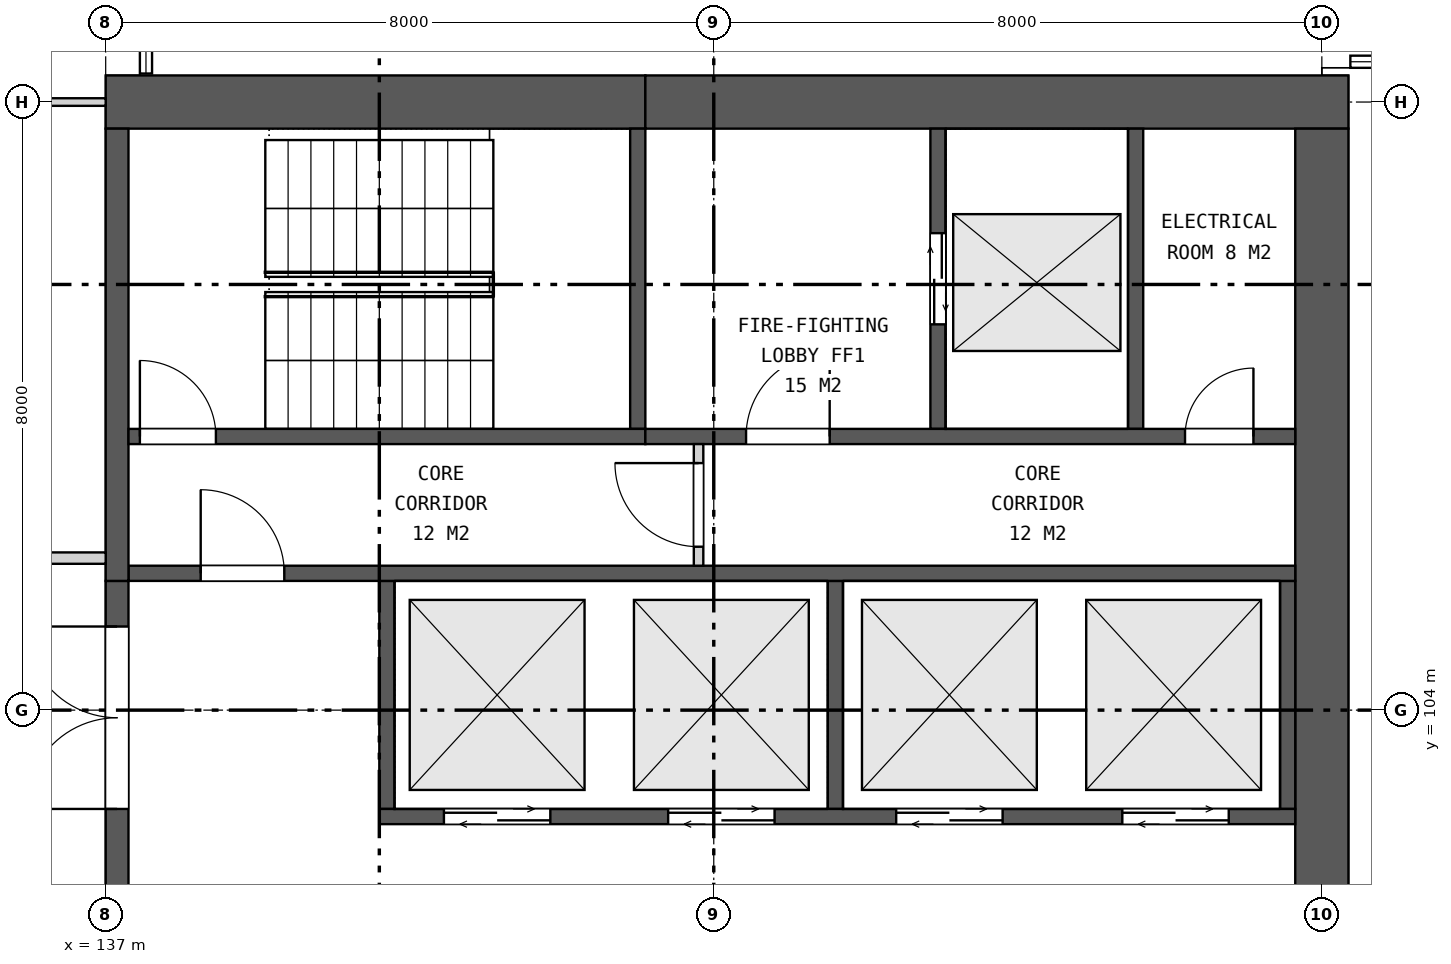
"""IFC4 building model, lengths in metres.
Left out: names, types, materials, properties, quantities, classifications, styles, units other than length and angle.
Written with IfcOpenShell. Run it as: python <this file> out.ifc"""

import sys

from ifc_helpers import new_model, si_unit, direction, frame, frame_2d, origin, place, context, subcontext, project, spatial, rectangle, extrude, element, fill, save


model = new_model("IFC4")
c1 = context("Model", 3, precision=1e-05, world=origin(), true_north=direction((0.0, 1.0)))
c2 = subcontext(c1, "Body", "Model", "MODEL_VIEW")
j1 = project(units=[si_unit("LENGTHUNIT", "METRE"), si_unit("PLANEANGLEUNIT", "RADIAN")], contexts=[c1])
p1 = place(None, origin())
s1 = spatial("IfcSite", under=j1, at=p1, CompositionType="ELEMENT")
p2 = place(p1, origin())
s2 = spatial("IfcBuilding", under=s1, at=p2, CompositionType="ELEMENT")
p3 = place(p2, frame((0.0, 0.0, 167.3)))
s3 = spatial("IfcBuildingStorey", under=s2, at=p3, CompositionType="ELEMENT", Elevation=167.3)
p4 = place(p3, frame((137.0, 112.0, 0.0), z_axis=(0.0, 0.0, 1.0), x_axis=(1.0, 0.0, 0.0)))
e1 = element("IfcWall", 1, at=p4, inside=s3, PredefinedType="SHEAR", context=c2, shape_type="SweptSolid", body=[
    extrude(rectangle(XDim=7.1, YDim=0.7, at=frame_2d((3.55, 0.0))), origin(), (0.0, 0.0, 1.0), 4.2),
])
p5 = place(p3, frame((144.1, 112.0, 0.0), z_axis=(0.0, 0.0, 1.0), x_axis=(1.0, 0.0, 0.0)))
e2 = element("IfcWall", 2, at=p5, inside=s3, PredefinedType="SHEAR", context=c2, shape_type="SweptSolid", body=[
    extrude(rectangle(XDim=9.25, YDim=0.7, at=frame_2d((4.625, 0.0))), origin(), (0.0, 0.0, 1.0), 4.2),
])
p6 = place(p3, frame((153.0, 88.35, 0.0), z_axis=(0.0, 0.0, 1.0), x_axis=(0.0, 1.0, 0.0)))
e3 = element("IfcWall", 3, at=p6, inside=s3, PredefinedType="SHEAR", context=c2, shape_type="SweptSolid", body=[
    extrude(rectangle(XDim=23.3, YDim=0.7, at=frame_2d((11.65, 0.0))), origin(), (0.0, 0.0, 1.0), 4.2),
])
p7 = place(p6, frame((10.45, 0.0, 0.0)))
e4 = element("IfcOpeningElement", 4, at=p7, cuts=e3, PredefinedType="OPENING", context=c2, shape_type="SweptSolid", body=[
    extrude(rectangle(XDim=2.4, YDim=2.4, at=frame_2d((1.2, 1.2))), frame((0.0, 0.36, 0.0), z_axis=(0.0, -1.0, 0.0), x_axis=(1.0, 0.0, 0.0)), (0.0, 0.0, 1.0), 0.72),
])
p8 = place(p3, frame((137.15, 94.3, 0.0), z_axis=(0.0, 0.0, 1.0), x_axis=(0.0, 1.0, 0.0)))
e5 = element("IfcWall", 5, at=p8, inside=s3, PredefinedType="SHEAR", context=c2, shape_type="SweptSolid", body=[
    extrude(rectangle(XDim=11.4, YDim=0.3, at=frame_2d((5.7, 0.0))), origin(), (0.0, 0.0, 1.0), 4.2),
])
p9 = place(p8, frame((0.6, 0.0, 0.0)))
e6 = element("IfcOpeningElement", 6, at=p9, cuts=e5, PredefinedType="OPENING", context=c2, shape_type="SweptSolid", body=[
    extrude(rectangle(XDim=2.4, YDim=2.4, at=frame_2d((1.2, 1.2))), frame((0.0, 0.16, 0.0), z_axis=(0.0, -1.0, 0.0), x_axis=(1.0, 0.0, 0.0)), (0.0, 0.0, 1.0), 0.32),
])
p10 = place(p8, frame((4.5, 0.0, 0.0)))
e7 = element("IfcOpeningElement", 7, at=p10, cuts=e5, PredefinedType="OPENING", context=c2, shape_type="SweptSolid", body=[
    extrude(rectangle(XDim=2.4, YDim=2.4, at=frame_2d((1.2, 1.2))), frame((0.0, 0.16, 0.0), z_axis=(0.0, -1.0, 0.0), x_axis=(1.0, 0.0, 0.0)), (0.0, 0.0, 1.0), 0.32),
])
p11 = place(p8, frame((8.4, 0.0, 0.0)))
e8 = element("IfcOpeningElement", 8, at=p11, cuts=e5, PredefinedType="OPENING", context=c2, shape_type="SweptSolid", body=[
    extrude(rectangle(XDim=2.4, YDim=2.4, at=frame_2d((1.2, 1.2))), frame((0.0, 0.16, 0.0), z_axis=(0.0, -1.0, 0.0), x_axis=(1.0, 0.0, 0.0)), (0.0, 0.0, 1.0), 0.32),
])
for number, where, z_axis, x_axis in (
    (9, (140.7, 102.7, 0.0), (0.0, 0.0, 1.0), (0.0, 1.0, 0.0)),
    (10, (146.6, 102.7, 0.0), (0.0, 0.0, 1.0), (0.0, 1.0, 0.0)),
    (11, (152.55, 102.7, 0.0), (0.0, 0.0, 1.0), (0.0, 1.0, 0.0)),
):
    element("IfcWall", number, at=place(p3, frame(where, z_axis=z_axis, x_axis=x_axis)), inside=s3, PredefinedType="SHEAR", context=c2, shape_type="SweptSolid", body=[
        extrude(rectangle(XDim=3.0, YDim=0.2, at=frame_2d((1.5, 0.0))), origin(), (0.0, 0.0, 1.0), 4.2),
    ])
p12 = place(p3, frame((140.6, 102.6, 0.0), z_axis=(0.0, 0.0, 1.0), x_axis=(1.0, 0.0, 0.0)))
e12 = element("IfcWall", 12, at=p12, inside=s3, PredefinedType="SHEAR", context=c2, shape_type="SweptSolid", body=[
    extrude(rectangle(XDim=12.05, YDim=0.2, at=frame_2d((6.025, 0.0))), origin(), (0.0, 0.0, 1.0), 4.2),
])
p13 = place(p12, frame((0.85, 0.0, 0.0)))
e13 = element("IfcOpeningElement", 13, at=p13, cuts=e12, PredefinedType="OPENING", context=c2, shape_type="SweptSolid", body=[
    extrude(rectangle(XDim=1.4, YDim=2.1, at=frame_2d((0.7, 1.05))), frame((0.0, 0.11, 0.0), z_axis=(0.0, -1.0, 0.0), x_axis=(1.0, 0.0, 0.0)), (0.0, 0.0, 1.0), 0.22),
])
p14 = place(p12, frame((3.8, 0.0, 0.0)))
e14 = element("IfcOpeningElement", 14, at=p14, cuts=e12, PredefinedType="OPENING", context=c2, shape_type="SweptSolid", body=[
    extrude(rectangle(XDim=1.4, YDim=2.1, at=frame_2d((0.7, 1.05))), frame((0.0, 0.11, 0.0), z_axis=(0.0, -1.0, 0.0), x_axis=(1.0, 0.0, 0.0)), (0.0, 0.0, 1.0), 0.22),
])
p15 = place(p12, frame((6.8, 0.0, 0.0)))
e15 = element("IfcOpeningElement", 15, at=p15, cuts=e12, PredefinedType="OPENING", context=c2, shape_type="SweptSolid", body=[
    extrude(rectangle(XDim=1.4, YDim=2.1, at=frame_2d((0.7, 1.05))), frame((0.0, 0.11, 0.0), z_axis=(0.0, -1.0, 0.0), x_axis=(1.0, 0.0, 0.0)), (0.0, 0.0, 1.0), 0.22),
])
p16 = place(p12, frame((9.775, 0.0, 0.0)))
e16 = element("IfcOpeningElement", 16, at=p16, cuts=e12, PredefinedType="OPENING", context=c2, shape_type="SweptSolid", body=[
    extrude(rectangle(XDim=1.4, YDim=2.1, at=frame_2d((0.7, 1.05))), frame((0.0, 0.11, 0.0), z_axis=(0.0, -1.0, 0.0), x_axis=(1.0, 0.0, 0.0)), (0.0, 0.0, 1.0), 0.22),
])
p17 = place(p3, frame((137.3, 105.8, 0.0), z_axis=(0.0, 0.0, 1.0), x_axis=(1.0, 0.0, 0.0)))
e17 = element("IfcWall", 17, at=p17, inside=s3, PredefinedType="SHEAR", context=c2, shape_type="SweptSolid", body=[
    extrude(rectangle(XDim=15.35, YDim=0.2, at=frame_2d((7.675, 0.0))), origin(), (0.0, 0.0, 1.0), 4.2),
])
p18 = place(p17, frame((0.95, 0.0, 0.0)))
e18 = element("IfcOpeningElement", 18, at=p18, cuts=e17, PredefinedType="OPENING", context=c2, shape_type="SweptSolid", body=[
    extrude(rectangle(XDim=1.1, YDim=2.1, at=frame_2d((0.55, 1.05))), frame((0.0, 0.11, 0.0), z_axis=(0.0, -1.0, 0.0), x_axis=(1.0, 0.0, 0.0)), (0.0, 0.0, 1.0), 0.22),
])
p19 = place(p3, frame((137.15, 105.7, 0.0), z_axis=(0.0, 0.0, 1.0), x_axis=(0.0, 1.0, 0.0)))
e19 = element("IfcWall", 19, at=p19, inside=s3, PredefinedType="SHEAR", context=c2, shape_type="SweptSolid", body=[
    extrude(rectangle(XDim=5.95, YDim=0.3, at=frame_2d((2.975, 0.0))), origin(), (0.0, 0.0, 1.0), 4.2),
])
p20 = place(p3, frame((144.0, 107.7, 0.0), z_axis=(0.0, 0.0, 1.0), x_axis=(0.0, 1.0, 0.0)))
e20 = element("IfcWall", 20, at=p20, inside=s3, PredefinedType="SHEAR", context=c2, shape_type="SweptSolid", body=[
    extrude(rectangle(XDim=3.95, YDim=0.2, at=frame_2d((1.975, 0.0))), origin(), (0.0, 0.0, 1.0), 4.2),
])
p21 = place(p3, frame((147.95, 107.7, 0.0), z_axis=(0.0, 0.0, 1.0), x_axis=(0.0, 1.0, 0.0)))
e21 = element("IfcWall", 21, at=p21, inside=s3, PredefinedType="SHEAR", context=c2, shape_type="SweptSolid", body=[
    extrude(rectangle(XDim=3.95, YDim=0.2, at=frame_2d((1.975, 0.0))), origin(), (0.0, 0.0, 1.0), 4.2),
])
p22 = place(p21, frame((1.375, 0.0, 0.0)))
e22 = element("IfcOpeningElement", 22, at=p22, cuts=e21, PredefinedType="OPENING", context=c2, shape_type="SweptSolid", body=[
    extrude(rectangle(XDim=1.2, YDim=2.1, at=frame_2d((0.6, 1.05))), frame((0.0, 0.11, 0.0), z_axis=(0.0, -1.0, 0.0), x_axis=(1.0, 0.0, 0.0)), (0.0, 0.0, 1.0), 0.22),
])
p23 = place(p3, frame((150.55, 107.7, 0.0), z_axis=(0.0, 0.0, 1.0), x_axis=(0.0, 1.0, 0.0)))
e23 = element("IfcWall", 23, at=p23, inside=s3, PredefinedType="SHEAR", context=c2, shape_type="SweptSolid", body=[
    extrude(rectangle(XDim=3.95, YDim=0.2, at=frame_2d((1.975, 0.0))), origin(), (0.0, 0.0, 1.0), 4.2),
])
p24 = place(p3, frame((137.3, 107.6, 0.0), z_axis=(0.0, 0.0, 1.0), x_axis=(1.0, 0.0, 0.0)))
e24 = element("IfcWall", 24, at=p24, inside=s3, PredefinedType="SHEAR", context=c2, shape_type="SweptSolid", body=[
    extrude(rectangle(XDim=6.8, YDim=0.2, at=frame_2d((3.4, 0.0))), origin(), (0.0, 0.0, 1.0), 4.2),
])
p25 = place(p24, frame((0.15, 0.0, 0.0)))
e25 = element("IfcOpeningElement", 25, at=p25, cuts=e24, PredefinedType="OPENING", context=c2, shape_type="SweptSolid", body=[
    extrude(rectangle(XDim=1.0, YDim=2.1, at=frame_2d((0.5, 1.05))), frame((0.0, 0.11, 0.0), z_axis=(0.0, -1.0, 0.0), x_axis=(1.0, 0.0, 0.0)), (0.0, 0.0, 1.0), 0.22),
])
p26 = place(p3, frame((144.1, 107.6, 0.0), z_axis=(0.0, 0.0, 1.0), x_axis=(1.0, 0.0, 0.0)))
e26 = element("IfcWall", 26, at=p26, inside=s3, PredefinedType="SHEAR", context=c2, shape_type="SweptSolid", body=[
    extrude(rectangle(XDim=8.55, YDim=0.2, at=frame_2d((4.275, 0.0))), origin(), (0.0, 0.0, 1.0), 4.2),
])
p27 = place(p26, frame((1.325, 0.0, 0.0)))
e27 = element("IfcOpeningElement", 27, at=p27, cuts=e26, PredefinedType="OPENING", context=c2, shape_type="SweptSolid", body=[
    extrude(rectangle(XDim=1.1, YDim=2.1, at=frame_2d((0.55, 1.05))), frame((0.0, 0.11, 0.0), z_axis=(0.0, -1.0, 0.0), x_axis=(1.0, 0.0, 0.0)), (0.0, 0.0, 1.0), 0.22),
])
p28 = place(p26, frame((7.1, 0.0, 0.0)))
e28 = element("IfcOpeningElement", 28, at=p28, cuts=e26, PredefinedType="OPENING", context=c2, shape_type="SweptSolid", body=[
    extrude(rectangle(XDim=0.9, YDim=2.1, at=frame_2d((0.45, 1.05))), frame((0.0, 0.11, 0.0), z_axis=(0.0, -1.0, 0.0), x_axis=(1.0, 0.0, 0.0)), (0.0, 0.0, 1.0), 0.22),
])
p29 = place(p3, frame((144.8, 105.9, 0.0), z_axis=(0.0, 0.0, 1.0), x_axis=(0.0, 1.0, 0.0)))
e29 = element("IfcWall", 29, at=p29, inside=s3, PredefinedType="PARTITIONING", context=c2, shape_type="SweptSolid", body=[
    extrude(rectangle(XDim=1.6, YDim=0.125, at=frame_2d((0.8, 0.0))), origin(), (0.0, 0.0, 1.0), 4.2),
])
p30 = place(p29, frame((0.25, 0.0, 0.0)))
e30 = element("IfcOpeningElement", 30, at=p30, cuts=e29, PredefinedType="OPENING", context=c2, shape_type="SweptSolid", body=[
    extrude(rectangle(XDim=1.1, YDim=2.1, at=frame_2d((0.55, 1.05))), frame((0.0, 0.073, 0.0), z_axis=(0.0, -1.0, 0.0), x_axis=(1.0, 0.0, 0.0)), (0.0, 0.0, 1.0), 0.145),
])
p31 = place(p3, frame((131.475, 106.0, 0.0), z_axis=(0.0, 0.0, 1.0), x_axis=(1.0, 0.0, 0.0)))
e31 = element("IfcWall", 31, at=p31, inside=s3, PredefinedType="PARTITIONING", context=c2, shape_type="SweptSolid", body=[
    extrude(rectangle(XDim=5.525, YDim=0.15, at=frame_2d((2.762, 0.0))), origin(), (0.0, 0.0, 1.0), 3.26),
])
p32 = place(p3, frame((126.275, 112.0, 0.0), z_axis=(0.0, 0.0, 1.0), x_axis=(1.0, 0.0, 0.0)))
e32 = element("IfcWall", 32, at=p32, inside=s3, PredefinedType="PARTITIONING", context=c2, shape_type="SweptSolid", body=[
    extrude(rectangle(XDim=10.725, YDim=0.1, at=frame_2d((5.363, 0.0))), origin(), (0.0, 0.0, 1.0), 3.26),
])
p33 = place(p11, origin())
e33 = element("IfcDoor", 33, at=p33, inside=s3, OperationType="DOUBLE_DOOR_SINGLE_SWING", PredefinedType="DOOR", context=c2, shape_type="SweptSolid", body=[
    extrude(rectangle(XDim=2.4, YDim=2.4, at=frame_2d((1.2, 1.2))), frame((0.0, 0.025, 0.0), z_axis=(0.0, -1.0, 0.0), x_axis=(1.0, 0.0, 0.0)), (0.0, 0.0, 1.0), 0.05),
])
fill(e8, e33)
p34 = place(p13, origin())
e34 = element("IfcDoor", 34, at=p34, inside=s3, OperationType="DOUBLE_DOOR_SLIDING", PredefinedType="DOOR", context=c2, shape_type="SweptSolid", body=[
    extrude(rectangle(XDim=1.4, YDim=2.1, at=frame_2d((0.7, 1.05))), frame((0.0, 0.025, 0.0), z_axis=(0.0, -1.0, 0.0), x_axis=(1.0, 0.0, 0.0)), (0.0, 0.0, 1.0), 0.05),
])
fill(e13, e34)
p35 = place(p14, origin())
e35 = element("IfcDoor", 35, at=p35, inside=s3, OperationType="DOUBLE_DOOR_SLIDING", PredefinedType="DOOR", context=c2, shape_type="SweptSolid", body=[
    extrude(rectangle(XDim=1.4, YDim=2.1, at=frame_2d((0.7, 1.05))), frame((0.0, 0.025, 0.0), z_axis=(0.0, -1.0, 0.0), x_axis=(1.0, 0.0, 0.0)), (0.0, 0.0, 1.0), 0.05),
])
fill(e14, e35)
p36 = place(p15, origin())
e36 = element("IfcDoor", 36, at=p36, inside=s3, OperationType="DOUBLE_DOOR_SLIDING", PredefinedType="DOOR", context=c2, shape_type="SweptSolid", body=[
    extrude(rectangle(XDim=1.4, YDim=2.1, at=frame_2d((0.7, 1.05))), frame((0.0, 0.025, 0.0), z_axis=(0.0, -1.0, 0.0), x_axis=(1.0, 0.0, 0.0)), (0.0, 0.0, 1.0), 0.05),
])
fill(e15, e36)
p37 = place(p16, origin())
e37 = element("IfcDoor", 37, at=p37, inside=s3, OperationType="DOUBLE_DOOR_SLIDING", PredefinedType="DOOR", context=c2, shape_type="SweptSolid", body=[
    extrude(rectangle(XDim=1.4, YDim=2.1, at=frame_2d((0.7, 1.05))), frame((0.0, 0.025, 0.0), z_axis=(0.0, -1.0, 0.0), x_axis=(1.0, 0.0, 0.0)), (0.0, 0.0, 1.0), 0.05),
])
fill(e16, e37)
p38 = place(p18, origin())
e38 = element("IfcDoor", 38, at=p38, inside=s3, OperationType="SINGLE_SWING_LEFT", PredefinedType="DOOR", context=c2, shape_type="SweptSolid", body=[
    extrude(rectangle(XDim=1.1, YDim=2.1, at=frame_2d((0.55, 1.05))), frame((0.0, 0.025, 0.0), z_axis=(0.0, -1.0, 0.0), x_axis=(1.0, 0.0, 0.0)), (0.0, 0.0, 1.0), 0.05),
])
fill(e18, e38)
p39 = place(p22, origin())
e39 = element("IfcDoor", 39, at=p39, inside=s3, OperationType="DOUBLE_DOOR_SLIDING", PredefinedType="DOOR", context=c2, shape_type="SweptSolid", body=[
    extrude(rectangle(XDim=1.2, YDim=2.1, at=frame_2d((0.6, 1.05))), frame((0.0, 0.025, 0.0), z_axis=(0.0, -1.0, 0.0), x_axis=(1.0, 0.0, 0.0)), (0.0, 0.0, 1.0), 0.05),
])
fill(e22, e39)
p40 = place(p25, origin())
e40 = element("IfcDoor", 40, at=p40, inside=s3, OperationType="SINGLE_SWING_LEFT", PredefinedType="DOOR", context=c2, shape_type="SweptSolid", body=[
    extrude(rectangle(XDim=1.0, YDim=2.1, at=frame_2d((0.5, 1.05))), frame((0.0, 0.025, 0.0), z_axis=(0.0, -1.0, 0.0), x_axis=(1.0, 0.0, 0.0)), (0.0, 0.0, 1.0), 0.05),
])
fill(e25, e40)
p41 = place(p27, origin())
e41 = element("IfcDoor", 41, at=p41, inside=s3, OperationType="SINGLE_SWING_RIGHT", PredefinedType="DOOR", context=c2, shape_type="SweptSolid", body=[
    extrude(rectangle(XDim=1.1, YDim=2.1, at=frame_2d((0.55, 1.05))), frame((0.0, 0.025, 0.0), z_axis=(0.0, -1.0, 0.0), x_axis=(1.0, 0.0, 0.0)), (0.0, 0.0, 1.0), 0.05),
])
fill(e27, e41)
p42 = place(p28, origin())
e42 = element("IfcDoor", 42, at=p42, inside=s3, OperationType="SINGLE_SWING_RIGHT", PredefinedType="DOOR", context=c2, shape_type="SweptSolid", body=[
    extrude(rectangle(XDim=0.9, YDim=2.1, at=frame_2d((0.45, 1.05))), frame((0.0, 0.025, 0.0), z_axis=(0.0, -1.0, 0.0), x_axis=(1.0, 0.0, 0.0)), (0.0, 0.0, 1.0), 0.05),
])
fill(e28, e42)
p43 = place(p30, origin())
e43 = element("IfcDoor", 43, at=p43, inside=s3, OperationType="SINGLE_SWING_RIGHT", PredefinedType="DOOR", context=c2, shape_type="SweptSolid", body=[
    extrude(rectangle(XDim=1.1, YDim=2.1, at=frame_2d((0.55, 1.05))), frame((0.0, 0.025, 0.0), z_axis=(0.0, -1.0, 0.0), x_axis=(1.0, 0.0, 0.0)), (0.0, 0.0, 1.0), 0.05),
])
fill(e30, e43)
save(model, sys.argv[1])
